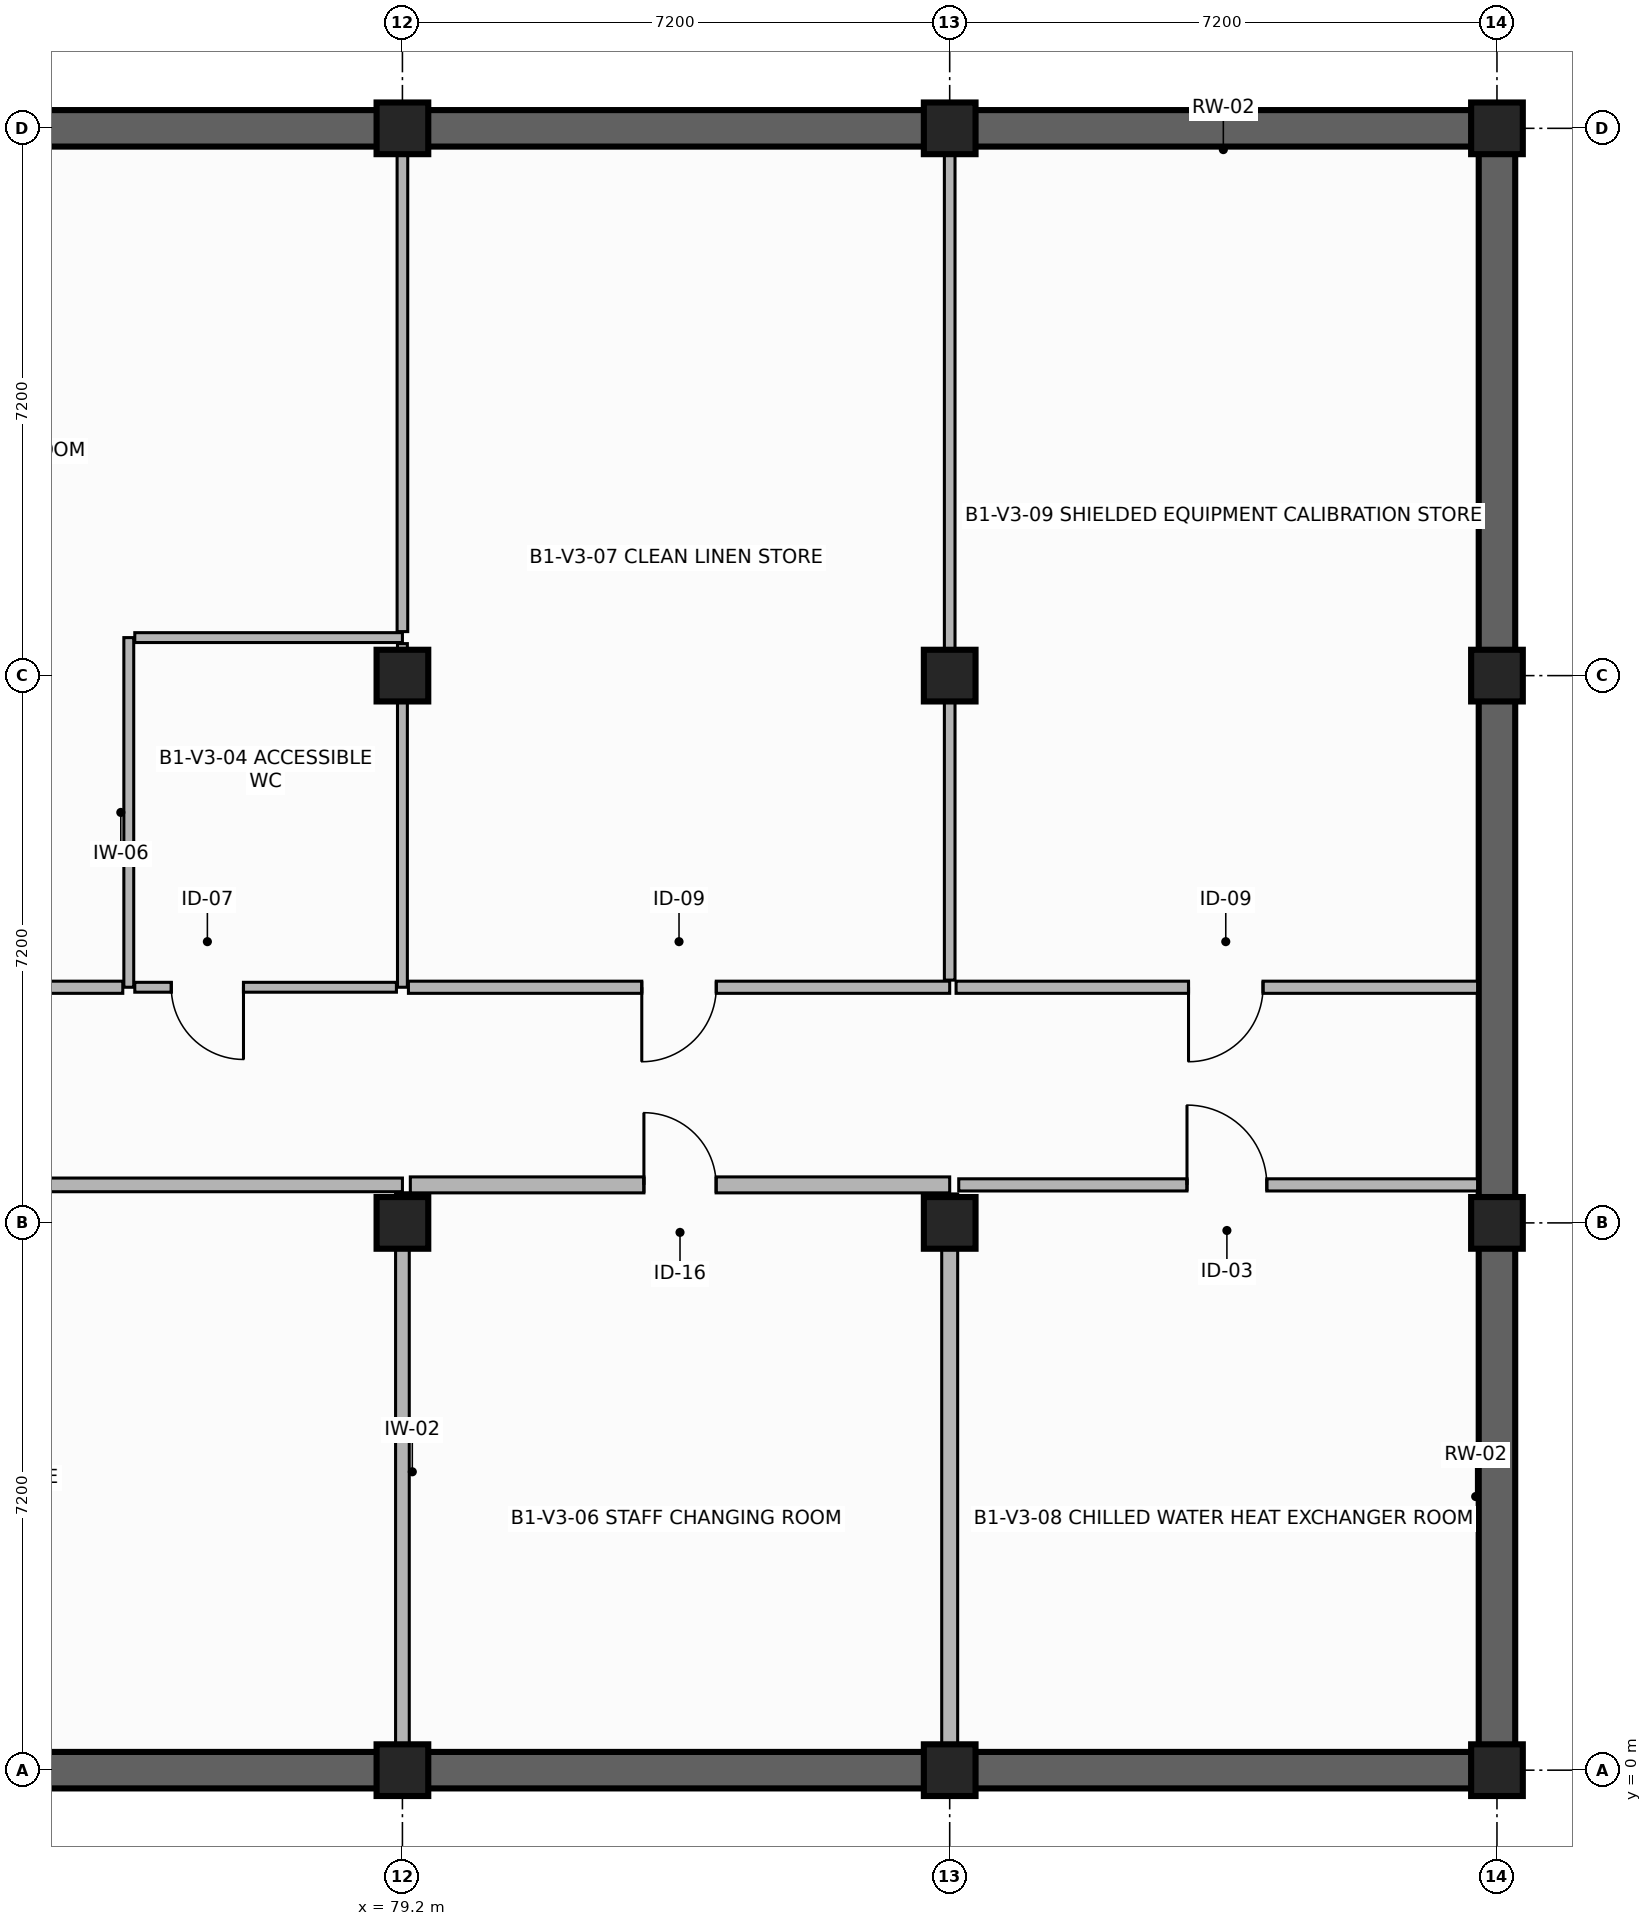
"""IFC4 building model, lengths in metres.
Left out: names, types, materials, properties, quantities, classifications, styles, units other than length and angle.
Written with IfcOpenShell. Run it as: python <this file> out.ifc"""

import sys

from ifc_helpers import new_model, si_unit, direction, frame, frame_2d, origin, origin_2d, place, context, subcontext, project, spatial, rectangle, extrude, element, fill, save


model = new_model("IFC4")
c1 = context("Model", 3, precision=1e-05, world=origin(), true_north=direction((0.0, 1.0)))
c2 = subcontext(c1, "Body", "Model", "MODEL_VIEW")
j1 = project(units=[si_unit("LENGTHUNIT", "METRE"), si_unit("PLANEANGLEUNIT", "RADIAN")], contexts=[c1])
p1 = place(None, origin())
s1 = spatial("IfcSite", under=j1, at=p1, CompositionType="ELEMENT")
p2 = place(p1, origin())
s2 = spatial("IfcBuilding", under=s1, at=p2, CompositionType="ELEMENT")
p3 = place(p2, frame((0.0, 0.0, -4.2)))
s3 = spatial("IfcBuildingStorey", under=s2, at=p3, CompositionType="ELEMENT", Elevation=-4.2)
for number, where, z_axis, x_axis in (
    (1, (79.2, 0.0, -0.4), (0.0, 0.0, 1.0), (1.0, 0.0, 0.0)),
    (2, (79.2, 7.2, -0.4), (0.0, 0.0, 1.0), (1.0, 0.0, 0.0)),
    (3, (79.2, 14.4, -0.4), (0.0, 0.0, 1.0), (1.0, 0.0, 0.0)),
    (4, (79.2, 21.6, -0.4), (0.0, 0.0, 1.0), (1.0, 0.0, 0.0)),
    (5, (86.4, 0.0, -0.4), (0.0, 0.0, 1.0), (1.0, 0.0, 0.0)),
    (6, (86.4, 7.2, -0.4), (0.0, 0.0, 1.0), (1.0, 0.0, 0.0)),
    (7, (86.4, 14.4, -0.4), (0.0, 0.0, 1.0), (1.0, 0.0, 0.0)),
    (8, (86.4, 21.6, -0.4), (0.0, 0.0, 1.0), (1.0, 0.0, 0.0)),
    (9, (93.6, 0.0, -0.4), (0.0, 0.0, 1.0), (1.0, 0.0, 0.0)),
    (10, (93.6, 7.2, -0.4), (0.0, 0.0, 1.0), (1.0, 0.0, 0.0)),
    (11, (93.6, 14.4, -0.4), (0.0, 0.0, 1.0), (1.0, 0.0, 0.0)),
    (12, (93.6, 21.6, -0.4), (0.0, 0.0, 1.0), (1.0, 0.0, 0.0)),
):
    element("IfcColumn", number, at=place(p3, frame(where, z_axis=z_axis, x_axis=x_axis)), inside=s3, PredefinedType="COLUMN", context=c2, shape_type="SweptSolid", body=[
        extrude(rectangle(XDim=0.68, YDim=0.68, at=origin_2d()), origin(), (0.0, 0.0, 1.0), 4.25),
    ])
for number, where, z_axis, x_axis in (
    (13, (72.0, 0.0, 0.0), (0.0, 0.0, 1.0), (1.0, 0.0, 0.0)),
    (14, (79.2, 0.0, 0.0), (0.0, 0.0, 1.0), (1.0, 0.0, 0.0)),
):
    element("IfcWall", number, at=place(p3, frame(where, z_axis=z_axis, x_axis=x_axis)), inside=s3, PredefinedType="ELEMENTEDWALL", context=c2, shape_type="SweptSolid", body=[
        extrude(rectangle(XDim=7.2, YDim=0.48, at=frame_2d((3.6, 0.0))), origin(), (0.0, 0.0, 1.0), 3.25),
    ])
p4 = place(p3, frame((86.4, 0.0, 0.0), z_axis=(0.0, 0.0, 1.0), x_axis=(1.0, 0.0, 0.0)))
e15 = element("IfcWall", 15, at=p4, inside=s3, PredefinedType="ELEMENTEDWALL", context=c2, shape_type="SweptSolid", body=[
    extrude(rectangle(XDim=7.2, YDim=0.48, at=frame_2d((3.6, 0.0))), origin(), (0.0, 0.0, 1.0), 3.25),
])
for number, where, z_axis, x_axis in (
    (16, (93.6, 0.0, 0.0), (0.0, 0.0, 1.0), (0.0, 1.0, 0.0)),
    (17, (93.6, 7.2, 0.0), (0.0, 0.0, 1.0), (0.0, 1.0, 0.0)),
):
    element("IfcWall", number, at=place(p3, frame(where, z_axis=z_axis, x_axis=x_axis)), inside=s3, PredefinedType="ELEMENTEDWALL", context=c2, shape_type="SweptSolid", body=[
        extrude(rectangle(XDim=7.2, YDim=0.48, at=frame_2d((3.6, 0.0))), origin(), (0.0, 0.0, 1.0), 3.25),
    ])
for number, where, z_axis, x_axis in (
    (18, (93.6, 14.4, 0.0), (0.0, 0.0, 1.0), (0.0, 1.0, 0.0)),
    (19, (93.6, 21.6, 0.0), (0.0, 0.0, 1.0), (-1.0, 0.0, 0.0)),
):
    element("IfcWall", number, at=place(p3, frame(where, z_axis=z_axis, x_axis=x_axis)), inside=s3, PredefinedType="ELEMENTEDWALL", context=c2, shape_type="SweptSolid", body=[
        extrude(rectangle(XDim=7.2, YDim=0.48, at=frame_2d((3.6, 0.0))), origin(), (0.0, 0.0, 1.0), 3.25),
    ])
for number, where, z_axis, x_axis in (
    (20, (86.4, 21.6, 0.0), (0.0, 0.0, 1.0), (-1.0, 0.0, 0.0)),
    (21, (79.2, 21.6, 0.0), (0.0, 0.0, 1.0), (-1.0, 0.0, 0.0)),
):
    element("IfcWall", number, at=place(p3, frame(where, z_axis=z_axis, x_axis=x_axis)), inside=s3, PredefinedType="ELEMENTEDWALL", context=c2, shape_type="SweptSolid", body=[
        extrude(rectangle(XDim=7.2, YDim=0.48, at=frame_2d((3.6, 0.0))), origin(), (0.0, 0.0, 1.0), 3.25),
    ])
p5 = place(p3, frame((64.904, 7.7, 0.0), z_axis=(0.0, 0.0, 1.0), x_axis=(1.0, 0.0, 0.0)))
e22 = element("IfcWall", 22, at=p5, inside=s3, PredefinedType="PARTITIONING", context=c2, shape_type="SweptSolid", body=[
    extrude(rectangle(XDim=14.296, YDim=0.18, at=frame_2d((7.148, 0.0))), origin(), (0.0, 0.0, 1.0), 3.26),
])
p6 = place(p5, frame((2.887, 0.0, 0.0)))
e23 = element("IfcOpeningElement", 23, at=p6, cuts=e22, PredefinedType="OPENING", context=c2, shape_type="SweptSolid", body=[
    extrude(rectangle(XDim=1.3, YDim=2.2, at=frame_2d((0.65, 1.1))), frame((0.0, 0.1, 0.0), z_axis=(0.0, -1.0, 0.0), x_axis=(1.0, 0.0, 0.0)), (0.0, 0.0, 1.0), 0.2),
])
p7 = place(p3, frame((79.2, 7.596, 0.0), z_axis=(0.0, 0.0, 1.0), x_axis=(0.0, -1.0, 0.0)))
e24 = element("IfcWall", 24, at=p7, inside=s3, PredefinedType="PARTITIONING", context=c2, shape_type="SweptSolid", body=[
    extrude(rectangle(XDim=7.341, YDim=0.18, at=frame_2d((3.67, 0.0))), origin(), (0.0, 0.0, 1.0), 3.26),
])
p8 = place(p3, frame((75.6, 10.3, 0.0), z_axis=(0.0, 0.0, 1.0), x_axis=(0.0, 1.0, 0.0)))
e25 = element("IfcWall", 25, at=p8, inside=s3, PredefinedType="PARTITIONING", context=c2, shape_type="SweptSolid", body=[
    extrude(rectangle(XDim=4.6, YDim=0.13, at=frame_2d((2.3, 0.0))), origin(), (0.0, 0.0, 1.0), 3.26),
])
p9 = place(p3, frame((75.679, 14.9, 0.0), z_axis=(0.0, 0.0, 1.0), x_axis=(1.0, 0.0, 0.0)))
e26 = element("IfcWall", 26, at=p9, inside=s3, PredefinedType="PARTITIONING", context=c2, shape_type="SweptSolid", body=[
    extrude(rectangle(XDim=3.521, YDim=0.13, at=frame_2d((1.76, 0.0))), origin(), (0.0, 0.0, 1.0), 3.26),
])
p10 = place(p3, frame((79.2, 14.821, 0.0), z_axis=(0.0, 0.0, 1.0), x_axis=(0.0, -1.0, 0.0)))
e27 = element("IfcWall", 27, at=p10, inside=s3, PredefinedType="PARTITIONING", context=c2, shape_type="SweptSolid", body=[
    extrude(rectangle(XDim=4.521, YDim=0.13, at=frame_2d((2.26, 0.0))), origin(), (0.0, 0.0, 1.0), 3.26),
])
p11 = place(p3, frame((79.121, 10.3, 0.0), z_axis=(0.0, 0.0, 1.0), x_axis=(-1.0, 0.0, 0.0)))
e28 = element("IfcWall", 28, at=p11, inside=s3, PredefinedType="PARTITIONING", context=c2, shape_type="SweptSolid", body=[
    extrude(rectangle(XDim=3.442, YDim=0.13, at=frame_2d((1.721, 0.0))), origin(), (0.0, 0.0, 1.0), 3.26),
])
p12 = place(p11, frame((2.012, 0.0, 0.0)))
e29 = element("IfcOpeningElement", 29, at=p12, cuts=e28, PredefinedType="OPENING", context=c2, shape_type="SweptSolid", body=[
    extrude(rectangle(XDim=0.95, YDim=2.1, at=frame_2d((0.475, 1.05))), frame((0.0, 0.075, 0.0), z_axis=(0.0, -1.0, 0.0), x_axis=(1.0, 0.0, 0.0)), (0.0, 0.0, 1.0), 0.15),
])
p13 = place(p3, frame((75.521, 10.3, 0.0), z_axis=(0.0, 0.0, 1.0), x_axis=(-1.0, 0.0, 0.0)))
e30 = element("IfcWall", 30, at=p13, inside=s3, PredefinedType="PARTITIONING", context=c2, shape_type="SweptSolid", body=[
    extrude(rectangle(XDim=10.721, YDim=0.16, at=frame_2d((5.36, 0.0))), origin(), (0.0, 0.0, 1.0), 3.26),
])
p14 = place(p13, frame((6.529, 0.0, 0.0)))
e31 = element("IfcOpeningElement", 31, at=p14, cuts=e30, PredefinedType="OPENING", context=c2, shape_type="SweptSolid", body=[
    extrude(rectangle(XDim=1.05, YDim=2.15, at=frame_2d((0.525, 1.075))), frame((0.0, 0.09, 0.0), z_axis=(0.0, -1.0, 0.0), x_axis=(1.0, 0.0, 0.0)), (0.0, 0.0, 1.0), 0.18),
])
p15 = place(p3, frame((79.2, 21.345, 0.0), z_axis=(0.0, 0.0, 1.0), x_axis=(0.0, -1.0, 0.0)))
e32 = element("IfcWall", 32, at=p15, inside=s3, PredefinedType="PARTITIONING", context=c2, shape_type="SweptSolid", body=[
    extrude(rectangle(XDim=6.366, YDim=0.14, at=frame_2d((3.183, 0.0))), origin(), (0.0, 0.0, 1.0), 3.26),
])
p16 = place(p3, frame((79.304, 7.7, 0.0), z_axis=(0.0, 0.0, 1.0), x_axis=(1.0, 0.0, 0.0)))
e33 = element("IfcWall", 33, at=p16, inside=s3, PredefinedType="PARTITIONING", context=c2, shape_type="SweptSolid", body=[
    extrude(rectangle(XDim=7.096, YDim=0.21, at=frame_2d((3.548, 0.0))), origin(), (0.0, 0.0, 1.0), 3.26),
])
p17 = place(p16, frame((3.073, 0.0, 0.0)))
e34 = element("IfcOpeningElement", 34, at=p17, cuts=e33, PredefinedType="OPENING", context=c2, shape_type="SweptSolid", body=[
    extrude(rectangle(XDim=0.95, YDim=2.15, at=frame_2d((0.475, 1.075))), frame((0.0, 0.115, 0.0), z_axis=(0.0, -1.0, 0.0), x_axis=(1.0, 0.0, 0.0)), (0.0, 0.0, 1.0), 0.23),
])
p18 = place(p3, frame((86.4, 7.581, 0.0), z_axis=(0.0, 0.0, 1.0), x_axis=(0.0, -1.0, 0.0)))
e35 = element("IfcWall", 35, at=p18, inside=s3, PredefinedType="PARTITIONING", context=c2, shape_type="SweptSolid", body=[
    extrude(rectangle(XDim=7.326, YDim=0.21, at=frame_2d((3.663, 0.0))), origin(), (0.0, 0.0, 1.0), 3.26),
])
p19 = place(p3, frame((86.4, 10.3, 0.0), z_axis=(0.0, 0.0, 1.0), x_axis=(-1.0, 0.0, 0.0)))
e36 = element("IfcWall", 36, at=p19, inside=s3, PredefinedType="PARTITIONING", context=c2, shape_type="SweptSolid", body=[
    extrude(rectangle(XDim=7.121, YDim=0.16, at=frame_2d((3.561, 0.0))), origin(), (0.0, 0.0, 1.0), 3.26),
])
p20 = place(p19, frame((3.071, 0.0, 0.0)))
e37 = element("IfcOpeningElement", 37, at=p20, cuts=e36, PredefinedType="OPENING", context=c2, shape_type="SweptSolid", body=[
    extrude(rectangle(XDim=0.98, YDim=2.15, at=frame_2d((0.49, 1.075))), frame((0.0, 0.09, 0.0), z_axis=(0.0, -1.0, 0.0), x_axis=(1.0, 0.0, 0.0)), (0.0, 0.0, 1.0), 0.18),
])
p21 = place(p3, frame((86.4, 21.345, 0.0), z_axis=(0.0, 0.0, 1.0), x_axis=(0.0, -1.0, 0.0)))
e38 = element("IfcWall", 38, at=p21, inside=s3, PredefinedType="PARTITIONING", context=c2, shape_type="SweptSolid", body=[
    extrude(rectangle(XDim=10.951, YDim=0.14, at=frame_2d((5.476, 0.0))), origin(), (0.0, 0.0, 1.0), 3.26),
])
p22 = place(p3, frame((86.519, 7.7, 0.0), z_axis=(0.0, 0.0, 1.0), x_axis=(1.0, 0.0, 0.0)))
e39 = element("IfcWall", 39, at=p22, inside=s3, PredefinedType="PARTITIONING", context=c2, shape_type="SweptSolid", body=[
    extrude(rectangle(XDim=6.826, YDim=0.16, at=frame_2d((3.413, 0.0))), origin(), (0.0, 0.0, 1.0), 3.26),
])
p23 = place(p22, frame((3.003, 0.0, 0.0)))
e40 = element("IfcOpeningElement", 40, at=p23, cuts=e39, PredefinedType="OPENING", context=c2, shape_type="SweptSolid", body=[
    extrude(rectangle(XDim=1.05, YDim=2.15, at=frame_2d((0.525, 1.075))), frame((0.0, 0.09, 0.0), z_axis=(0.0, -1.0, 0.0), x_axis=(1.0, 0.0, 0.0)), (0.0, 0.0, 1.0), 0.18),
])
p24 = place(p3, frame((93.345, 10.3, 0.0), z_axis=(0.0, 0.0, 1.0), x_axis=(-1.0, 0.0, 0.0)))
e41 = element("IfcWall", 41, at=p24, inside=s3, PredefinedType="PARTITIONING", context=c2, shape_type="SweptSolid", body=[
    extrude(rectangle(XDim=6.861, YDim=0.16, at=frame_2d((3.431, 0.0))), origin(), (0.0, 0.0, 1.0), 3.26),
])
p25 = place(p24, frame((2.823, 0.0, 0.0)))
e42 = element("IfcOpeningElement", 42, at=p25, cuts=e41, PredefinedType="OPENING", context=c2, shape_type="SweptSolid", body=[
    extrude(rectangle(XDim=0.98, YDim=2.15, at=frame_2d((0.49, 1.075))), frame((0.0, 0.09, 0.0), z_axis=(0.0, -1.0, 0.0), x_axis=(1.0, 0.0, 0.0)), (0.0, 0.0, 1.0), 0.18),
])
p26 = place(p12, origin())
e43 = element("IfcDoor", 43, at=p26, inside=s3, OperationType="SINGLE_SWING_LEFT", PredefinedType="DOOR", context=c2, shape_type="SweptSolid", body=[
    extrude(rectangle(XDim=0.95, YDim=2.1, at=frame_2d((0.475, 1.05))), frame((0.0, 0.025, 0.0), z_axis=(0.0, -1.0, 0.0), x_axis=(1.0, 0.0, 0.0)), (0.0, 0.0, 1.0), 0.05),
])
fill(e29, e43)
p27 = place(p17, origin())
e44 = element("IfcDoor", 44, at=p27, inside=s3, OperationType="SINGLE_SWING_LEFT", PredefinedType="DOOR", context=c2, shape_type="SweptSolid", body=[
    extrude(rectangle(XDim=0.95, YDim=2.15, at=frame_2d((0.475, 1.075))), frame((0.0, 0.025, 0.0), z_axis=(0.0, -1.0, 0.0), x_axis=(1.0, 0.0, 0.0)), (0.0, 0.0, 1.0), 0.05),
])
fill(e34, e44)
p28 = place(p20, origin())
e45 = element("IfcDoor", 45, at=p28, inside=s3, OperationType="SINGLE_SWING_RIGHT", PredefinedType="DOOR", context=c2, shape_type="SweptSolid", body=[
    extrude(rectangle(XDim=0.98, YDim=2.15, at=frame_2d((0.49, 1.075))), frame((0.0, 0.025, 0.0), z_axis=(0.0, -1.0, 0.0), x_axis=(1.0, 0.0, 0.0)), (0.0, 0.0, 1.0), 0.05),
])
fill(e37, e45)
p29 = place(p23, origin())
e46 = element("IfcDoor", 46, at=p29, inside=s3, OperationType="SINGLE_SWING_LEFT", PredefinedType="DOOR", context=c2, shape_type="SweptSolid", body=[
    extrude(rectangle(XDim=1.05, YDim=2.15, at=frame_2d((0.525, 1.075))), frame((0.0, 0.025, 0.0), z_axis=(0.0, -1.0, 0.0), x_axis=(1.0, 0.0, 0.0)), (0.0, 0.0, 1.0), 0.05),
])
fill(e40, e46)
p30 = place(p25, origin())
e47 = element("IfcDoor", 47, at=p30, inside=s3, OperationType="SINGLE_SWING_RIGHT", PredefinedType="DOOR", context=c2, shape_type="SweptSolid", body=[
    extrude(rectangle(XDim=0.98, YDim=2.15, at=frame_2d((0.49, 1.075))), frame((0.0, 0.025, 0.0), z_axis=(0.0, -1.0, 0.0), x_axis=(1.0, 0.0, 0.0)), (0.0, 0.0, 1.0), 0.05),
])
fill(e42, e47)
save(model, sys.argv[1])
